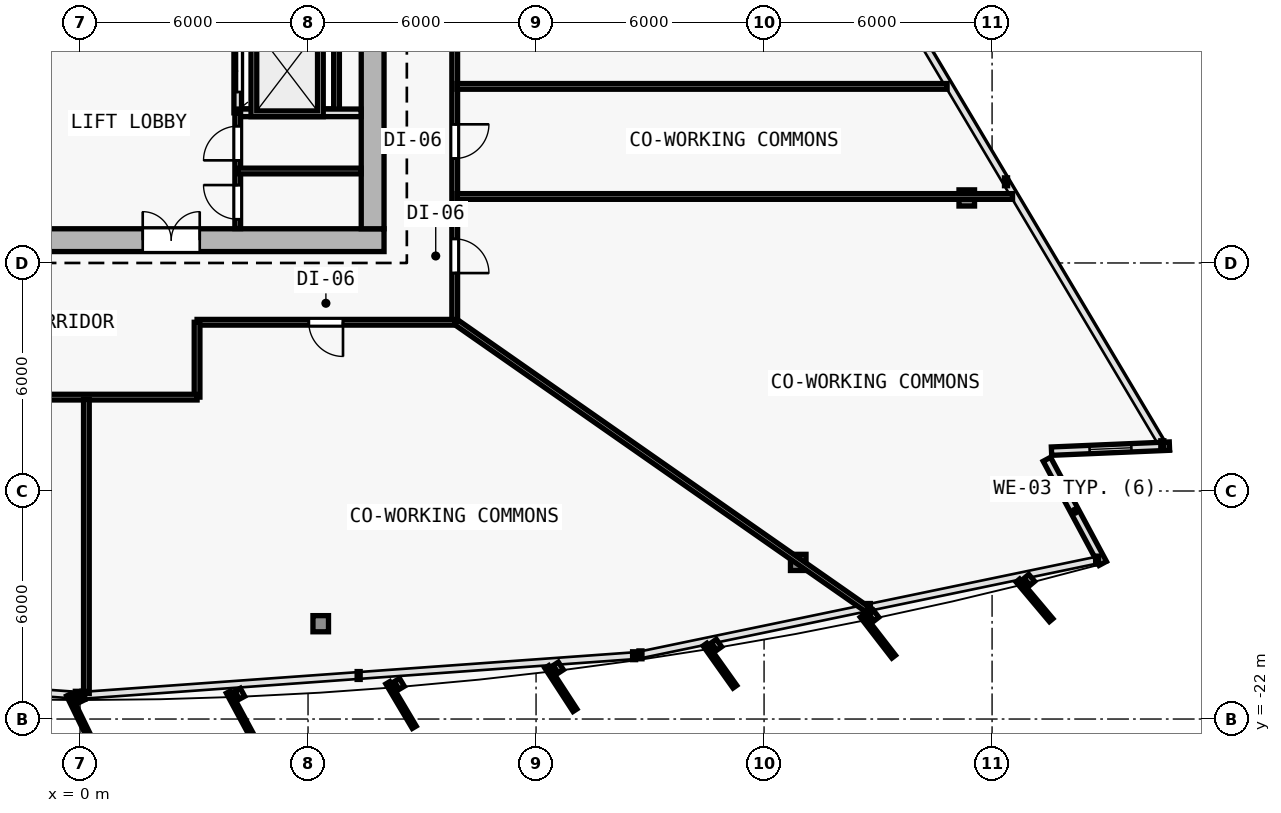
"""IFC4 building model, lengths in metres.
Left out: names, types, materials, properties, quantities, classifications, styles, units other than length and angle.
Written with IfcOpenShell. Run it as: python <this file> out.ifc"""

import sys

from ifc_helpers import new_model, si_unit, direction, frame, frame_2d, origin, origin_2d, place, context, subcontext, project, spatial, rectangle, i_section, extrude, element, fill, save


model = new_model("IFC4")
c1 = context("Model", 3, precision=1e-05, world=origin(), true_north=direction((0.0, 1.0)))
c2 = subcontext(c1, "Body", "Model", "MODEL_VIEW")
j1 = project(units=[si_unit("LENGTHUNIT", "METRE"), si_unit("PLANEANGLEUNIT", "RADIAN")], contexts=[c1])
p1 = place(None, origin())
s1 = spatial("IfcSite", under=j1, at=p1, CompositionType="ELEMENT")
p2 = place(p1, origin())
s2 = spatial("IfcBuilding", under=s1, at=p2, CompositionType="ELEMENT")
p3 = place(p2, frame((0.0, 0.0, 100.5)))
s3 = spatial("IfcBuildingStorey", under=s2, at=p3, CompositionType="ELEMENT", Elevation=100.5)
for number, where, z_axis, x_axis in (
    (1, (7.7, -9.4, 0.0), (0.0, 0.0, 1.0), (1.0, 0.0, 0.0)),
    (2, (0.0, -9.4, 0.0), (0.0, 0.0, 1.0), (1.0, 0.0, 0.0)),
):
    element("IfcColumn", number, at=place(p3, frame(where, z_axis=z_axis, x_axis=x_axis)), inside=s3, PredefinedType="COLUMN", context=c2, shape_type="SweptSolid", body=[
        extrude(i_section(OverallWidth=0.409, OverallDepth=0.425, WebThickness=0.021, FlangeThickness=0.034, FilletRadius=0.015, at=origin_2d()), origin(), (0.0, 0.0, 1.0), 3.6),
    ])
p4 = place(p3, frame((6.334, -19.492, 0.006), z_axis=(-0.006866324617, 0.035215407439, 0.999356157066), x_axis=(-0.981516643497, -0.191376797284, 0.0)))
e3 = element("IfcColumn", 3, at=p4, inside=s3, PredefinedType="COLUMN", context=c2, shape_type="SweptSolid", body=[
    extrude(i_section(OverallWidth=0.409, OverallDepth=0.425, WebThickness=0.021, FlangeThickness=0.034, FilletRadius=0.015, at=origin_2d()), origin(), (0.0, 0.0, 1.0), 3.591),
])
p5 = place(p3, frame((18.899, -17.879, 0.006), z_axis=(-0.020664238418, 0.033511412961, 0.999224686671), x_axis=(-0.851183725565, -0.524867855115, 0.0)))
e4 = element("IfcColumn", 4, at=p5, inside=s3, PredefinedType="COLUMN", context=c2, shape_type="SweptSolid", body=[
    extrude(i_section(OverallWidth=0.409, OverallDepth=0.425, WebThickness=0.021, FlangeThickness=0.034, FilletRadius=0.015, at=origin_2d()), origin(), (0.0, 0.0, 1.0), 3.592),
])
p6 = place(p3, frame((23.334, -8.289, 0.006), z_axis=(-0.026039494941, 0.021620259507, 0.999427090428), x_axis=(-0.638800249892, -0.769372628015, 0.0)))
e5 = element("IfcColumn", 5, at=p6, inside=s3, PredefinedType="COLUMN", context=c2, shape_type="SweptSolid", body=[
    extrude(i_section(OverallWidth=0.409, OverallDepth=0.425, WebThickness=0.021, FlangeThickness=0.034, FilletRadius=0.015, at=origin_2d()), origin(), (0.0, 0.0, 1.0), 3.591),
])
p7 = place(p3, frame((25.442, -15.165, 0.0), z_axis=(0.0, 0.0, 1.0), x_axis=(0.472811757317, -0.881163459378, 0.0)))
e6 = element("IfcWall", 6, at=p7, inside=s3, PredefinedType="SOLIDWALL", context=c2, shape_type="SweptSolid", body=[
    extrude(rectangle(XDim=3.11, YDim=0.22, at=frame_2d((1.555, 0.0))), origin(), (0.0, 0.0, 1.0), 3.35),
])
p8 = place(p3, frame((28.667, -14.819, 0.0), z_axis=(0.0, 0.0, 1.0), x_axis=(-0.99909228571, -0.042598176436, 0.0)))
e7 = element("IfcWall", 7, at=p8, inside=s3, PredefinedType="SOLIDWALL", context=c2, shape_type="SweptSolid", body=[
    extrude(rectangle(XDim=3.106, YDim=0.22, at=frame_2d((1.553, 0.0))), origin(), (0.0, 0.0, 1.0), 3.35),
])
p9 = place(p8, frame((1.003, 0.0, 0.62)))
e8 = element("IfcOpeningElement", 8, at=p9, cuts=e7, PredefinedType="OPENING", context=c2, shape_type="SweptSolid", body=[
    extrude(rectangle(XDim=1.1, YDim=1.8, at=frame_2d((0.55, 0.9))), frame((0.0, 0.12, 0.0), z_axis=(0.0, -1.0, 0.0), x_axis=(1.0, 0.0, 0.0)), (0.0, 0.0, 1.0), 0.24),
])
p10 = place(p3, frame((-8.0, -9.4, 0.0), z_axis=(0.0, 0.0, 1.0), x_axis=(1.0, 0.0, 0.0)))
e9 = element("IfcWall", 9, at=p10, inside=s3, PredefinedType="SHEAR", context=c2, shape_type="SweptSolid", body=[
    extrude(rectangle(XDim=16.0, YDim=0.6, at=frame_2d((8.0, 0.0))), origin(), (0.0, 0.0, 1.0), 3.35),
])
p11 = place(p10, frame((9.65, 0.0, 0.0)))
e10 = element("IfcOpeningElement", 10, at=p11, cuts=e9, PredefinedType="OPENING", context=c2, shape_type="SweptSolid", body=[
    extrude(rectangle(XDim=1.5, YDim=2.2, at=frame_2d((0.75, 1.1))), frame((0.0, 0.31, 0.0), z_axis=(0.0, -1.0, 0.0), x_axis=(1.0, 0.0, 0.0)), (0.0, 0.0, 1.0), 0.62),
])
p12 = place(p3, frame((7.7, 9.9, 0.0), z_axis=(0.0, 0.0, 1.0), x_axis=(0.0, -1.0, 0.0)))
e11 = element("IfcWall", 11, at=p12, inside=s3, PredefinedType="SHEAR", context=c2, shape_type="SweptSolid", body=[
    extrude(rectangle(XDim=19.0, YDim=0.6, at=frame_2d((9.5, 0.0))), origin(), (0.0, 0.0, 1.0), 3.35),
])
p13 = place(p3, frame((4.15, -6.05, 0.0), z_axis=(0.0, 0.0, 1.0), x_axis=(0.0, 1.0, 0.0)))
e12 = element("IfcWall", 12, at=p13, inside=s3, PredefinedType="SOLIDWALL", context=c2, shape_type="SweptSolid", body=[
    extrude(rectangle(XDim=8.7, YDim=0.2, at=frame_2d((4.35, 0.0))), origin(), (0.0, 0.0, 1.0), 3.35),
])
p14 = place(p13, frame((0.55, 0.0, 0.0)))
e13 = element("IfcOpeningElement", 13, at=p14, cuts=e12, PredefinedType="OPENING", context=c2, shape_type="SweptSolid", body=[
    extrude(rectangle(XDim=1.1, YDim=2.15, at=frame_2d((0.55, 1.075))), frame((0.0, 0.11, 0.0), z_axis=(0.0, -1.0, 0.0), x_axis=(1.0, 0.0, 0.0)), (0.0, 0.0, 1.0), 0.22),
])
p15 = place(p13, frame((2.65, 0.0, 0.0)))
e14 = element("IfcOpeningElement", 14, at=p15, cuts=e12, PredefinedType="OPENING", context=c2, shape_type="SweptSolid", body=[
    extrude(rectangle(XDim=1.1, YDim=2.15, at=frame_2d((0.55, 1.075))), frame((0.0, 0.11, 0.0), z_axis=(0.0, -1.0, 0.0), x_axis=(1.0, 0.0, 0.0)), (0.0, 0.0, 1.0), 0.22),
])
p16 = place(p13, frame((4.75, 0.0, 0.0)))
e15 = element("IfcOpeningElement", 15, at=p16, cuts=e12, PredefinedType="OPENING", context=c2, shape_type="SweptSolid", body=[
    extrude(rectangle(XDim=1.1, YDim=2.15, at=frame_2d((0.55, 1.075))), frame((0.0, 0.11, 0.0), z_axis=(0.0, -1.0, 0.0), x_axis=(1.0, 0.0, 0.0)), (0.0, 0.0, 1.0), 0.22),
])
p17 = place(p13, frame((6.85, 0.0, 0.0)))
e16 = element("IfcOpeningElement", 16, at=p17, cuts=e12, PredefinedType="OPENING", context=c2, shape_type="SweptSolid", body=[
    extrude(rectangle(XDim=1.1, YDim=2.15, at=frame_2d((0.55, 1.075))), frame((0.0, 0.11, 0.0), z_axis=(0.0, -1.0, 0.0), x_axis=(1.0, 0.0, 0.0)), (0.0, 0.0, 1.0), 0.22),
])
p18 = place(p3, frame((6.75, -6.05, 0.0), z_axis=(0.0, 0.0, 1.0), x_axis=(0.0, 1.0, 0.0)))
e17 = element("IfcWall", 17, at=p18, inside=s3, PredefinedType="PARTITIONING", context=c2, shape_type="SweptSolid", body=[
    extrude(rectangle(XDim=8.7, YDim=0.15, at=frame_2d((4.35, 0.0))), origin(), (0.0, 0.0, 1.0), 3.35),
])
p19 = place(p3, frame((4.15, -6.05, 0.0), z_axis=(0.0, 0.0, 1.0), x_axis=(1.0, 0.0, 0.0)))
e18 = element("IfcWall", 18, at=p19, inside=s3, PredefinedType="SOLIDWALL", context=c2, shape_type="SweptSolid", body=[
    extrude(rectangle(XDim=3.245, YDim=0.2, at=frame_2d((1.623, 0.0))), origin(), (0.0, 0.0, 1.0), 3.35),
])
p20 = place(p3, frame((4.15, -9.095, 0.0), z_axis=(0.0, 0.0, 1.0), x_axis=(0.0, 1.0, 0.0)))
e19 = element("IfcWall", 19, at=p20, inside=s3, PredefinedType="PARTITIONING", context=c2, shape_type="SweptSolid", body=[
    extrude(rectangle(XDim=3.045, YDim=0.15, at=frame_2d((1.522, 0.0))), origin(), (0.0, 0.0, 1.0), 3.35),
])
p21 = place(p20, frame((0.245, 0.0, 0.0)))
e20 = element("IfcOpeningElement", 20, at=p21, cuts=e19, PredefinedType="OPENING", context=c2, shape_type="SweptSolid", body=[
    extrude(rectangle(XDim=0.9, YDim=2.1, at=frame_2d((0.45, 1.05))), frame((0.0, 0.085, 0.0), z_axis=(0.0, -1.0, 0.0), x_axis=(1.0, 0.0, 0.0)), (0.0, 0.0, 1.0), 0.17),
])
p22 = place(p20, frame((1.795, 0.0, 0.0)))
e21 = element("IfcOpeningElement", 21, at=p22, cuts=e19, PredefinedType="OPENING", context=c2, shape_type="SweptSolid", body=[
    extrude(rectangle(XDim=0.9, YDim=2.1, at=frame_2d((0.45, 1.05))), frame((0.0, 0.085, 0.0), z_axis=(0.0, -1.0, 0.0), x_axis=(1.0, 0.0, 0.0)), (0.0, 0.0, 1.0), 0.17),
])
p23 = place(p3, frame((4.15, -7.58, 0.0), z_axis=(0.0, 0.0, 1.0), x_axis=(1.0, 0.0, 0.0)))
e22 = element("IfcWall", 22, at=p23, inside=s3, PredefinedType="PARTITIONING", context=c2, shape_type="SweptSolid", body=[
    extrude(rectangle(XDim=3.245, YDim=0.15, at=frame_2d((1.623, 0.0))), origin(), (0.0, 0.0, 1.0), 3.35),
])
p24 = place(p3, frame((9.86, 8.426, 0.0), z_axis=(0.0, 0.0, 1.0), x_axis=(0.0, -1.0, 0.0)))
e23 = element("IfcWall", 23, at=p24, inside=s3, PredefinedType="PARTITIONING", context=c2, shape_type="SweptSolid", body=[
    extrude(rectangle(XDim=19.986, YDim=0.15, at=frame_2d((9.993, 0.0))), origin(), (0.0, 0.0, 1.0), 2.705),
])
p25 = place(p24, frame((17.792, 0.0, 0.0)))
e24 = element("IfcOpeningElement", 24, at=p25, cuts=e23, PredefinedType="OPENING", context=c2, shape_type="SweptSolid", body=[
    extrude(rectangle(XDim=0.9, YDim=2.1, at=frame_2d((0.45, 1.05))), frame((0.0, 0.085, 0.0), z_axis=(0.0, -1.0, 0.0), x_axis=(1.0, 0.0, 0.0)), (0.0, 0.0, 1.0), 0.17),
])
p26 = place(p24, frame((14.778, 0.0, 0.0)))
e25 = element("IfcOpeningElement", 25, at=p26, cuts=e23, PredefinedType="OPENING", context=c2, shape_type="SweptSolid", body=[
    extrude(rectangle(XDim=0.9, YDim=2.1, at=frame_2d((0.45, 1.05))), frame((0.0, 0.085, 0.0), z_axis=(0.0, -1.0, 0.0), x_axis=(1.0, 0.0, 0.0)), (0.0, 0.0, 1.0), 0.17),
])
p27 = place(p24, frame((11.806, 0.0, 0.0)))
e26 = element("IfcOpeningElement", 26, at=p27, cuts=e23, PredefinedType="OPENING", context=c2, shape_type="SweptSolid", body=[
    extrude(rectangle(XDim=0.9, YDim=2.1, at=frame_2d((0.45, 1.05))), frame((0.0, 0.085, 0.0), z_axis=(0.0, -1.0, 0.0), x_axis=(1.0, 0.0, 0.0)), (0.0, 0.0, 1.0), 0.17),
])
p28 = place(p24, frame((8.796, 0.0, 0.0)))
e27 = element("IfcOpeningElement", 27, at=p28, cuts=e23, PredefinedType="OPENING", context=c2, shape_type="SweptSolid", body=[
    extrude(rectangle(XDim=0.9, YDim=2.1, at=frame_2d((0.45, 1.05))), frame((0.0, 0.085, 0.0), z_axis=(0.0, -1.0, 0.0), x_axis=(1.0, 0.0, 0.0)), (0.0, 0.0, 1.0), 0.17),
])
p29 = place(p24, frame((6.19, 0.0, 0.0)))
e28 = element("IfcOpeningElement", 28, at=p29, cuts=e23, PredefinedType="OPENING", context=c2, shape_type="SweptSolid", body=[
    extrude(rectangle(XDim=0.9, YDim=2.1, at=frame_2d((0.45, 1.05))), frame((0.0, 0.085, 0.0), z_axis=(0.0, -1.0, 0.0), x_axis=(1.0, 0.0, 0.0)), (0.0, 0.0, 1.0), 0.17),
])
p30 = place(p24, frame((2.399, 0.0, 0.0)))
e29 = element("IfcOpeningElement", 29, at=p30, cuts=e23, PredefinedType="OPENING", context=c2, shape_type="SweptSolid", body=[
    extrude(rectangle(XDim=0.9, YDim=2.1, at=frame_2d((0.45, 1.05))), frame((0.0, 0.085, 0.0), z_axis=(0.0, -1.0, 0.0), x_axis=(1.0, 0.0, 0.0)), (0.0, 0.0, 1.0), 0.17),
])
p31 = place(p3, frame((9.86, -11.56, 0.0), z_axis=(0.0, 0.0, 1.0), x_axis=(-1.0, 0.0, 0.0)))
e30 = element("IfcWall", 30, at=p31, inside=s3, PredefinedType="PARTITIONING", context=c2, shape_type="SweptSolid", body=[
    extrude(rectangle(XDim=6.78, YDim=0.15, at=frame_2d((3.39, 0.0))), origin(), (0.0, 0.0, 1.0), 2.925),
])
p32 = place(p31, frame((2.94, 0.0, 0.0)))
e31 = element("IfcOpeningElement", 31, at=p32, cuts=e30, PredefinedType="OPENING", context=c2, shape_type="SweptSolid", body=[
    extrude(rectangle(XDim=0.9, YDim=2.1, at=frame_2d((0.45, 1.05))), frame((0.0, 0.085, 0.0), z_axis=(0.0, -1.0, 0.0), x_axis=(1.0, 0.0, 0.0)), (0.0, 0.0, 1.0), 0.17),
])
p33 = place(p3, frame((3.08, -11.56, 0.0), z_axis=(0.0, 0.0, 1.0), x_axis=(0.0, -1.0, 0.0)))
e32 = element("IfcWall", 32, at=p33, inside=s3, PredefinedType="PARTITIONING", context=c2, shape_type="SweptSolid", body=[
    extrude(rectangle(XDim=1.97, YDim=0.15, at=frame_2d((0.985, 0.0))), origin(), (0.0, 0.0, 1.0), 2.925),
])
p34 = place(p3, frame((3.08, -13.53, 0.0), z_axis=(0.0, 0.0, 1.0), x_axis=(-1.0, 0.0, 0.0)))
e33 = element("IfcWall", 33, at=p34, inside=s3, PredefinedType="PARTITIONING", context=c2, shape_type="SweptSolid", body=[
    extrude(rectangle(XDim=6.16, YDim=0.15, at=frame_2d((3.08, 0.0))), origin(), (0.0, 0.0, 1.0), 2.775),
])
p35 = place(p3, frame((9.896, -11.558, 0.0), z_axis=(0.0, 0.0, 1.0), x_axis=(0.819892596191, -0.572517362803, 0.0)))
e34 = element("IfcWall", 34, at=p35, inside=s3, PredefinedType="PARTITIONING", context=c2, shape_type="SweptSolid", body=[
    extrude(rectangle(XDim=13.339, YDim=0.15, at=frame_2d((6.67, 0.0))), origin(), (0.0, 0.0, 1.0), 2.775),
])
p36 = place(p3, frame((9.92, -8.25, 0.0), z_axis=(0.0, 0.0, 1.0), x_axis=(1.0, 0.0, 0.0)))
e35 = element("IfcWall", 35, at=p36, inside=s3, PredefinedType="PARTITIONING", context=c2, shape_type="SweptSolid", body=[
    extrude(rectangle(XDim=14.618, YDim=0.15, at=frame_2d((7.309, 0.0))), origin(), (0.0, 0.0, 1.0), 2.705),
])
p37 = place(p3, frame((0.167, -13.59, 0.0), z_axis=(0.0, 0.0, 1.0), x_axis=(0.0, -1.0, 0.0)))
e36 = element("IfcWall", 36, at=p37, inside=s3, PredefinedType="PARTITIONING", context=c2, shape_type="SweptSolid", body=[
    extrude(rectangle(XDim=7.739, YDim=0.15, at=frame_2d((3.87, 0.0))), origin(), (0.0, 0.0, 1.0), 2.825),
])
p38 = place(p3, frame((9.92, -5.354, 0.0), z_axis=(0.0, 0.0, 1.0), x_axis=(1.0, 0.0, 0.0)))
e37 = element("IfcWall", 37, at=p38, inside=s3, PredefinedType="PARTITIONING", context=c2, shape_type="SweptSolid", body=[
    extrude(rectangle(XDim=12.896, YDim=0.15, at=frame_2d((6.448, 0.0))), origin(), (0.0, 0.0, 1.0), 2.835),
])
p39 = place(p9, origin())
e38 = element("IfcWindow", 38, at=p39, inside=s3, PartitioningType="SINGLE_PANEL", PredefinedType="WINDOW", context=c2, shape_type="SweptSolid", body=[
    extrude(rectangle(XDim=1.1, YDim=1.8, at=frame_2d((0.55, 0.9))), frame((0.0, 0.03, 0.0), z_axis=(0.0, -1.0, 0.0), x_axis=(1.0, 0.0, 0.0)), (0.0, 0.0, 1.0), 0.06),
])
fill(e8, e38)
p40 = place(p11, origin())
e39 = element("IfcDoor", 39, at=p40, inside=s3, OperationType="DOUBLE_DOOR_SINGLE_SWING", PredefinedType="DOOR", context=c2, shape_type="SweptSolid", body=[
    extrude(rectangle(XDim=1.5, YDim=2.2, at=frame_2d((0.75, 1.1))), frame((0.0, 0.025, 0.0), z_axis=(0.0, -1.0, 0.0), x_axis=(1.0, 0.0, 0.0)), (0.0, 0.0, 1.0), 0.05),
])
fill(e10, e39)
p41 = place(p14, origin())
e40 = element("IfcDoor", 40, at=p41, inside=s3, OperationType="DOUBLE_DOOR_SLIDING", PredefinedType="DOOR", context=c2, shape_type="SweptSolid", body=[
    extrude(rectangle(XDim=1.1, YDim=2.15, at=frame_2d((0.55, 1.075))), frame((0.0, 0.025, 0.0), z_axis=(0.0, -1.0, 0.0), x_axis=(1.0, 0.0, 0.0)), (0.0, 0.0, 1.0), 0.05),
])
fill(e13, e40)
p42 = place(p21, origin())
e41 = element("IfcDoor", 41, at=p42, inside=s3, OperationType="SINGLE_SWING_RIGHT", PredefinedType="DOOR", context=c2, shape_type="SweptSolid", body=[
    extrude(rectangle(XDim=0.9, YDim=2.1, at=frame_2d((0.45, 1.05))), frame((0.0, 0.025, 0.0), z_axis=(0.0, -1.0, 0.0), x_axis=(1.0, 0.0, 0.0)), (0.0, 0.0, 1.0), 0.05),
])
fill(e20, e41)
p43 = place(p22, origin())
e42 = element("IfcDoor", 42, at=p43, inside=s3, OperationType="SINGLE_SWING_LEFT", PredefinedType="DOOR", context=c2, shape_type="SweptSolid", body=[
    extrude(rectangle(XDim=0.9, YDim=2.1, at=frame_2d((0.45, 1.05))), frame((0.0, 0.025, 0.0), z_axis=(0.0, -1.0, 0.0), x_axis=(1.0, 0.0, 0.0)), (0.0, 0.0, 1.0), 0.05),
])
fill(e21, e42)
p44 = place(p32, origin())
e43 = element("IfcDoor", 43, at=p44, inside=s3, OperationType="SINGLE_SWING_LEFT", PredefinedType="DOOR", context=c2, shape_type="SweptSolid", body=[
    extrude(rectangle(XDim=0.9, YDim=2.1, at=frame_2d((0.45, 1.05))), frame((0.0, 0.025, 0.0), z_axis=(0.0, -1.0, 0.0), x_axis=(1.0, 0.0, 0.0)), (0.0, 0.0, 1.0), 0.05),
])
fill(e31, e43)
p45 = place(p25, origin())
e44 = element("IfcDoor", 44, at=p45, inside=s3, OperationType="SINGLE_SWING_RIGHT", PredefinedType="DOOR", context=c2, shape_type="SweptSolid", body=[
    extrude(rectangle(XDim=0.9, YDim=2.1, at=frame_2d((0.45, 1.05))), frame((0.0, 0.025, 0.0), z_axis=(0.0, -1.0, 0.0), x_axis=(1.0, 0.0, 0.0)), (0.0, 0.0, 1.0), 0.05),
])
fill(e24, e44)
p46 = place(p26, origin())
e45 = element("IfcDoor", 45, at=p46, inside=s3, OperationType="SINGLE_SWING_LEFT", PredefinedType="DOOR", context=c2, shape_type="SweptSolid", body=[
    extrude(rectangle(XDim=0.9, YDim=2.1, at=frame_2d((0.45, 1.05))), frame((0.0, 0.025, 0.0), z_axis=(0.0, -1.0, 0.0), x_axis=(1.0, 0.0, 0.0)), (0.0, 0.0, 1.0), 0.05),
])
fill(e25, e45)
save(model, sys.argv[1])
